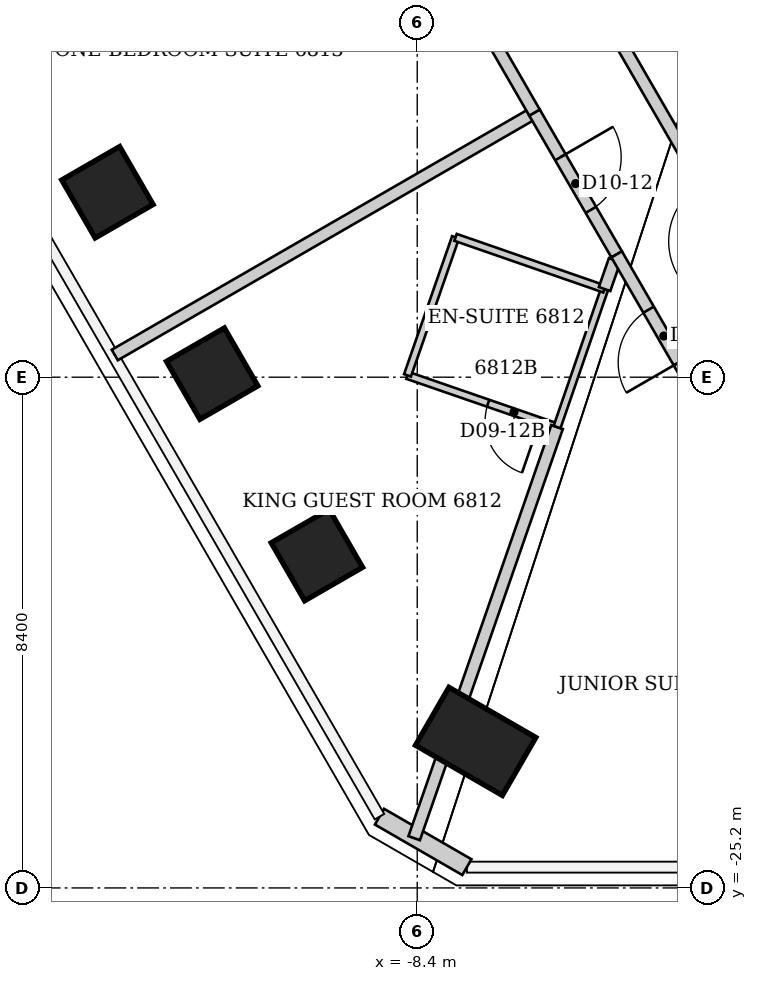
"""IFC4 building model, lengths in metres.
Left out: names, types, materials, properties, quantities, classifications, styles, units other than length and angle.
Written with IfcOpenShell. Run it as: python <this file> out.ifc"""

import sys

from ifc_helpers import new_model, si_unit, direction, frame, frame_2d, origin, origin_2d, place, context, subcontext, project, spatial, rectangle, extrude, element, fill, save


model = new_model("IFC4")
c1 = context("Model", 3, precision=1e-05, world=origin(), true_north=direction((0.0, 1.0)))
c2 = subcontext(c1, "Body", "Model", "MODEL_VIEW")
j1 = project(units=[si_unit("LENGTHUNIT", "METRE"), si_unit("PLANEANGLEUNIT", "RADIAN")], contexts=[c1])
p1 = place(None, origin())
s1 = spatial("IfcSite", under=j1, at=p1, CompositionType="ELEMENT")
p2 = place(p1, origin())
s2 = spatial("IfcBuilding", under=s1, at=p2, CompositionType="ELEMENT")
p3 = place(p2, frame((0.0, 0.0, 272.2)))
s3 = spatial("IfcBuildingStorey", under=s2, at=p3, CompositionType="ELEMENT", Elevation=272.2)
p4 = place(p3, frame((-7.439, -22.79, 0.0), z_axis=(0.0, 0.0, 1.0), x_axis=(-0.5, -0.866025403784, 0.0)))
e1 = element("IfcColumn", 1, at=p4, inside=s3, PredefinedType="COLUMN", context=c2, shape_type="SweptSolid", body=[
    extrude(rectangle(XDim=1.1, YDim=1.65, at=origin_2d()), origin(), (0.0, 0.0, 1.0), 3.8),
])
for number, where, z_axis, x_axis in (
    (2, (-10.05, -19.725, 0.0), (0.0, 0.0, 1.0), (-0.866, -0.5, 0.0)),
    (3, (-11.773, -16.742, 0.0), (0.0, 0.0, 1.0), (-0.866, -0.5, 0.0)),
    (4, (-13.495, -13.759, 0.0), (0.0, 0.0, 1.0), (-0.866, -0.5, 0.0)),
):
    element("IfcColumn", number, at=place(p3, frame(where, z_axis=z_axis, x_axis=x_axis)), inside=s3, PredefinedType="COLUMN", context=c2, shape_type="SweptSolid", body=[
        extrude(rectangle(XDim=1.1, YDim=1.1, at=origin_2d()), origin(), (0.0, 0.0, 1.0), 3.8),
    ])
p5 = place(p3, frame((-7.583, -24.858, 0.0), z_axis=(0.0, 0.0, 1.0), x_axis=(-0.865989634427, 0.500061949227, 0.0)))
e5 = element("IfcWall", 5, at=p5, inside=s3, PredefinedType="SOLIDWALL", context=c2, shape_type="SweptSolid", body=[
    extrude(rectangle(XDim=1.66, YDim=0.3, at=frame_2d((0.83, 0.0))), origin(), (0.0, 0.0, 1.0), 3.64),
])
p6 = place(p3, frame((-13.374, -16.435, 0.0), z_axis=(0.0, 0.0, 1.0), x_axis=(0.866082379937, 0.499901301422, 0.0)))
e6 = element("IfcWall", 6, at=p6, inside=s3, PredefinedType="PARTITIONING", context=c2, shape_type="SweptSolid", body=[
    extrude(rectangle(XDim=7.957, YDim=0.2, at=frame_2d((3.978, 0.0))), origin(), (0.0, 0.0, 1.0), 3.64),
])
p7 = place(p3, frame((-9.92, -6.47, 0.0), z_axis=(0.0, 0.0, 1.0), x_axis=(0.499718371597, -0.866187940974, 0.0)))
e7 = element("IfcWall", 7, at=p7, inside=s3, PredefinedType="PARTITIONING", context=c2, shape_type="SweptSolid", body=[
    extrude(rectangle(XDim=6.904, YDim=0.2, at=frame_2d((3.452, 0.0))), origin(), (0.0, 0.0, 1.0), 3.64),
])
p8 = place(p7, frame((2.952, 0.0, 0.0)))
e8 = element("IfcOpeningElement", 8, at=p8, cuts=e7, PredefinedType="OPENING", context=c2, shape_type="SweptSolid", body=[
    extrude(rectangle(XDim=1.0, YDim=2.13, at=frame_2d((0.5, 1.065))), frame((0.0, 0.1, 0.0), z_axis=(0.0, -1.0, 0.0), x_axis=(1.0, 0.0, 0.0)), (0.0, 0.0, 1.0), 0.2),
])
p9 = place(p3, frame((-8.56, -16.77, 0.0), z_axis=(0.0, 0.0, 1.0), x_axis=(0.94515546045, -0.326620813149, 0.0)))
e9 = element("IfcWall", 9, at=p9, inside=s3, PredefinedType="PARTITIONING", context=c2, shape_type="SweptSolid", body=[
    extrude(rectangle(XDim=2.603, YDim=0.12, at=frame_2d((1.301, 0.0))), origin(), (0.0, 0.0, 1.0), 3.64),
])
p10 = place(p9, frame((1.403, 0.0, 0.0)))
e10 = element("IfcOpeningElement", 10, at=p10, cuts=e9, PredefinedType="OPENING", context=c2, shape_type="SweptSolid", body=[
    extrude(rectangle(XDim=0.9, YDim=2.03, at=frame_2d((0.45, 1.015))), frame((0.0, 0.06, 0.0), z_axis=(0.0, -1.0, 0.0), x_axis=(1.0, 0.0, 0.0)), (0.0, 0.0, 1.0), 0.12),
])
p11 = place(p3, frame((-8.45, -24.382, 0.0), z_axis=(0.0, 0.0, 1.0), x_axis=(0.328306316797, 0.944571311417, 0.0)))
e11 = element("IfcWall", 11, at=p11, inside=s3, PredefinedType="PARTITIONING", context=c2, shape_type="SweptSolid", body=[
    extrude(rectangle(XDim=7.158, YDim=0.2, at=frame_2d((3.579, 0.0))), origin(), (0.0, 0.0, 1.0), 3.64),
])
p12 = place(p3, frame((-7.77, -14.5, 0.0), z_axis=(0.0, 0.0, 1.0), x_axis=(-0.328693963496, -0.944436487203, 0.0)))
e12 = element("IfcWall", 12, at=p12, inside=s3, PredefinedType="PARTITIONING", context=c2, shape_type="SweptSolid", body=[
    extrude(rectangle(XDim=2.404, YDim=0.12, at=frame_2d((1.202, 0.0))), origin(), (0.0, 0.0, 1.0), 3.64),
])
p13 = place(p3, frame((-6.47, -12.45, 0.0), z_axis=(0.0, 0.0, 1.0), x_axis=(0.501275699481, -0.865287624498, 0.0)))
e13 = element("IfcWall", 13, at=p13, inside=s3, PredefinedType="PARTITIONING", context=c2, shape_type="SweptSolid", body=[
    extrude(rectangle(XDim=2.693, YDim=0.2, at=frame_2d((1.346, 0.0))), origin(), (0.0, 0.0, 1.0), 3.64),
])
p14 = place(p13, frame((0.846, 0.0, 0.0)))
e14 = element("IfcOpeningElement", 14, at=p14, cuts=e13, PredefinedType="OPENING", context=c2, shape_type="SweptSolid", body=[
    extrude(rectangle(XDim=1.0, YDim=2.13, at=frame_2d((0.5, 1.065))), frame((0.0, 0.1, 0.0), z_axis=(0.0, -1.0, 0.0), x_axis=(1.0, 0.0, 0.0)), (0.0, 0.0, 1.0), 0.2),
])
p15 = place(p3, frame((-6.1, -17.62, 0.0), z_axis=(0.0, 0.0, 1.0), x_axis=(0.325457785204, 0.945556571576, 0.0)))
e15 = element("IfcWall", 15, at=p15, inside=s3, PredefinedType="PARTITIONING", context=c2, shape_type="SweptSolid", body=[
    extrude(rectangle(XDim=2.4, YDim=0.12, at=frame_2d((1.2, 0.0))), origin(), (0.0, 0.0, 1.0), 3.64),
])
p16 = place(p3, frame((-5.32, -15.35, 0.0), z_axis=(0.0, 0.0, 1.0), x_axis=(-0.944742926852, 0.327812144624, 0.0)))
e16 = element("IfcWall", 16, at=p16, inside=s3, PredefinedType="PARTITIONING", context=c2, shape_type="SweptSolid", body=[
    extrude(rectangle(XDim=2.593, YDim=0.12, at=frame_2d((1.297, 0.0))), origin(), (0.0, 0.0, 1.0), 3.64),
])
p17 = place(p3, frame((-5.319, -15.35, 0.0), z_axis=(0.0, 0.0, 1.0), x_axis=(0.329422375526, 0.944182661619, 0.0)))
e17 = element("IfcWall", 17, at=p17, inside=s3, PredefinedType="PARTITIONING", context=c2, shape_type="SweptSolid", body=[
    extrude(rectangle(XDim=0.504, YDim=0.2, at=frame_2d((0.252, 0.0))), origin(), (0.0, 0.0, 1.0), 3.64),
])
p18 = place(p3, frame((-5.12, -14.78, 0.0), z_axis=(0.0, 0.0, 1.0), x_axis=(0.499813401482, -0.866133109688, 0.0)))
e18 = element("IfcWall", 18, at=p18, inside=s3, PredefinedType="PARTITIONING", context=c2, shape_type="SweptSolid", body=[
    extrude(rectangle(XDim=2.401, YDim=0.2, at=frame_2d((1.201, 0.0))), origin(), (0.0, 0.0, 1.0), 3.64),
])
p19 = place(p18, frame((1.05, 0.0, 0.0)))
e19 = element("IfcOpeningElement", 19, at=p19, cuts=e18, PredefinedType="OPENING", context=c2, shape_type="SweptSolid", body=[
    extrude(rectangle(XDim=1.0, YDim=2.13, at=frame_2d((0.5, 1.065))), frame((0.0, 0.1, 0.0), z_axis=(0.0, -1.0, 0.0), x_axis=(1.0, 0.0, 0.0)), (0.0, 0.0, 1.0), 0.2),
])
p20 = place(p3, frame((-4.0, -13.12, 0.0), z_axis=(0.0, 0.0, 1.0), x_axis=(-0.500218436225, 0.865899252835, 0.0)))
e20 = element("IfcWall", 20, at=p20, inside=s3, PredefinedType="PARTITIONING", context=c2, shape_type="SweptSolid", body=[
    extrude(rectangle(XDim=7.357, YDim=0.2, at=frame_2d((3.678, 0.0))), origin(), (0.0, 0.0, 1.0), 3.64),
])
p21 = place(p20, frame((3.128, 0.0, 0.0)))
e21 = element("IfcOpeningElement", 21, at=p21, cuts=e20, PredefinedType="OPENING", context=c2, shape_type="SweptSolid", body=[
    extrude(rectangle(XDim=1.1, YDim=2.2, at=frame_2d((0.55, 1.1))), frame((0.0, 0.1, 0.0), z_axis=(0.0, -1.0, 0.0), x_axis=(1.0, 0.0, 0.0)), (0.0, 0.0, 1.0), 0.2),
])
p22 = place(p19, origin())
e22 = element("IfcDoor", 22, at=p22, inside=s3, OperationType="SINGLE_SWING_RIGHT", PredefinedType="DOOR", context=c2, shape_type="SweptSolid", body=[
    extrude(rectangle(XDim=1.0, YDim=2.13, at=frame_2d((0.5, 1.065))), frame((0.0, 0.025, 0.0), z_axis=(0.0, -1.0, 0.0), x_axis=(1.0, 0.0, 0.0)), (0.0, 0.0, 1.0), 0.05),
])
fill(e19, e22)
p23 = place(p14, origin())
e23 = element("IfcDoor", 23, at=p23, inside=s3, OperationType="SINGLE_SWING_LEFT", PredefinedType="DOOR", context=c2, shape_type="SweptSolid", body=[
    extrude(rectangle(XDim=1.0, YDim=2.13, at=frame_2d((0.5, 1.065))), frame((0.0, 0.025, 0.0), z_axis=(0.0, -1.0, 0.0), x_axis=(1.0, 0.0, 0.0)), (0.0, 0.0, 1.0), 0.05),
])
fill(e14, e23)
p24 = place(p10, origin())
e24 = element("IfcDoor", 24, at=p24, inside=s3, OperationType="SINGLE_SWING_RIGHT", PredefinedType="DOOR", context=c2, shape_type="SweptSolid", body=[
    extrude(rectangle(XDim=0.9, YDim=2.03, at=frame_2d((0.45, 1.015))), frame((0.0, 0.025, 0.0), z_axis=(0.0, -1.0, 0.0), x_axis=(1.0, 0.0, 0.0)), (0.0, 0.0, 1.0), 0.05),
])
fill(e10, e24)
save(model, sys.argv[1])
